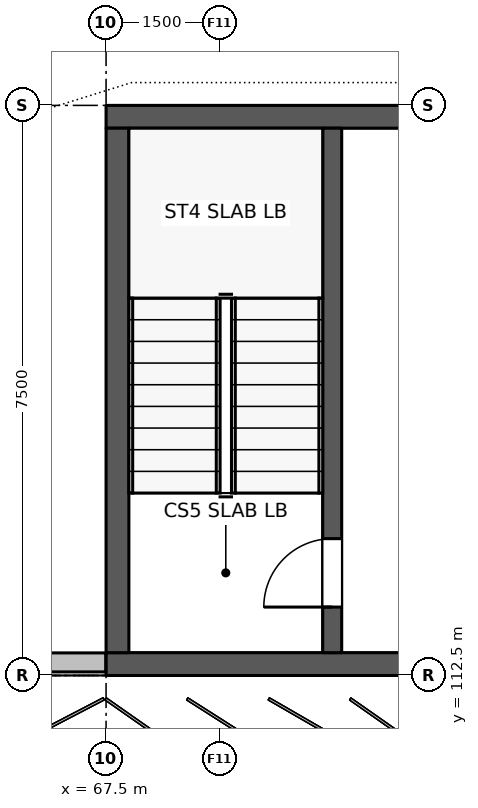
"""IFC4 building model, lengths in metres.
Left out: names, types, materials, properties, quantities, classifications, styles, units other than length and angle.
Written with IfcOpenShell. Run it as: python <this file> out.ifc"""

import sys

from ifc_helpers import new_model, si_unit, direction, frame, frame_2d, origin, place, context, subcontext, project, spatial, rectangle, extrude, element, fill, save


model = new_model("IFC4")
c1 = context("Model", 3, precision=1e-05, world=origin(), true_north=direction((0.0, 1.0)))
c2 = subcontext(c1, "Body", "Model", "MODEL_VIEW")
j1 = project(units=[si_unit("LENGTHUNIT", "METRE"), si_unit("PLANEANGLEUNIT", "RADIAN")], contexts=[c1])
p1 = place(None, origin())
s1 = spatial("IfcSite", under=j1, at=p1, CompositionType="ELEMENT")
p2 = place(p1, origin())
s2 = spatial("IfcBuilding", under=s1, at=p2, CompositionType="ELEMENT")
p3 = place(p2, frame((0.0, 0.0, 9.9)))
s3 = spatial("IfcBuildingStorey", under=s2, at=p3, CompositionType="ELEMENT", Elevation=9.9)
p4 = place(p3, frame((60.186, 112.672, 0.0), z_axis=(0.0, 0.0, 1.0), x_axis=(1.0, 0.0, 0.0)))
e1 = element("IfcWall", 1, at=p4, inside=s3, PredefinedType="SOLIDWALL", context=c2, shape_type="SweptSolid", body=[
    extrude(rectangle(XDim=7.31, YDim=0.25, at=frame_2d((3.655, 0.0))), origin(), (0.0, 0.0, 1.0), 1.1),
])
p5 = place(p3, frame((67.5, 119.85, 0.0), z_axis=(0.0, 0.0, 1.0), x_axis=(1.0, 0.0, 0.0)))
e2 = element("IfcWall", 2, at=p5, inside=s3, PredefinedType="SHEAR", context=c2, shape_type="SweptSolid", body=[
    extrude(rectangle(XDim=15.0, YDim=0.3, at=frame_2d((7.5, 0.0))), origin(), (0.0, 0.0, 1.0), 3.3),
])
p6 = place(p5, frame((6.6, 0.0, 0.0)))
e3 = element("IfcOpeningElement", 3, at=p6, cuts=e2, PredefinedType="OPENING", context=c2, shape_type="SweptSolid", body=[
    extrude(rectangle(XDim=1.8, YDim=2.1, at=frame_2d((0.9, 1.05))), frame((0.0, 0.16, 0.0), z_axis=(0.0, -1.0, 0.0), x_axis=(1.0, 0.0, 0.0)), (0.0, 0.0, 1.0), 0.32),
])
p7 = place(p3, frame((72.5, 112.65, 0.0), z_axis=(0.0, 0.0, 1.0), x_axis=(-1.0, 0.0, 0.0)))
e4 = element("IfcWall", 4, at=p7, inside=s3, PredefinedType="SHEAR", context=c2, shape_type="SweptSolid", body=[
    extrude(rectangle(XDim=5.0, YDim=0.3, at=frame_2d((2.5, 0.0))), origin(), (0.0, 0.0, 1.0), 3.3),
])
p8 = place(p3, frame((67.65, 119.7, 0.0), z_axis=(0.0, 0.0, 1.0), x_axis=(0.0, -1.0, 0.0)))
e5 = element("IfcWall", 5, at=p8, inside=s3, PredefinedType="SHEAR", context=c2, shape_type="SweptSolid", body=[
    extrude(rectangle(XDim=6.9, YDim=0.3, at=frame_2d((3.45, 0.0))), origin(), (0.0, 0.0, 1.0), 3.3),
])
p9 = place(p3, frame((70.475, 112.8, 0.0), z_axis=(0.0, 0.0, 1.0), x_axis=(0.0, 1.0, 0.0)))
e6 = element("IfcWall", 6, at=p9, inside=s3, PredefinedType="STANDARD", context=c2, shape_type="SweptSolid", body=[
    extrude(rectangle(XDim=6.9, YDim=0.25, at=frame_2d((3.45, 0.0))), origin(), (0.0, 0.0, 1.0), 3.1),
])
p10 = place(p9, frame((0.6, 0.0, 0.0)))
e7 = element("IfcOpeningElement", 7, at=p10, cuts=e6, PredefinedType="OPENING", context=c2, shape_type="SweptSolid", body=[
    extrude(rectangle(XDim=0.9, YDim=2.1, at=frame_2d((0.45, 1.05))), frame((0.0, 0.135, 0.0), z_axis=(0.0, -1.0, 0.0), x_axis=(1.0, 0.0, 0.0)), (0.0, 0.0, 1.0), 0.27),
])
p11 = place(p10, origin())
e8 = element("IfcDoor", 8, at=p11, inside=s3, OperationType="SINGLE_SWING_RIGHT", PredefinedType="DOOR", context=c2, shape_type="SweptSolid", body=[
    extrude(rectangle(XDim=0.9, YDim=2.1, at=frame_2d((0.45, 1.05))), frame((0.0, 0.025, 0.0), z_axis=(0.0, -1.0, 0.0), x_axis=(1.0, 0.0, 0.0)), (0.0, 0.0, 1.0), 0.05),
])
fill(e7, e8)
save(model, sys.argv[1])
